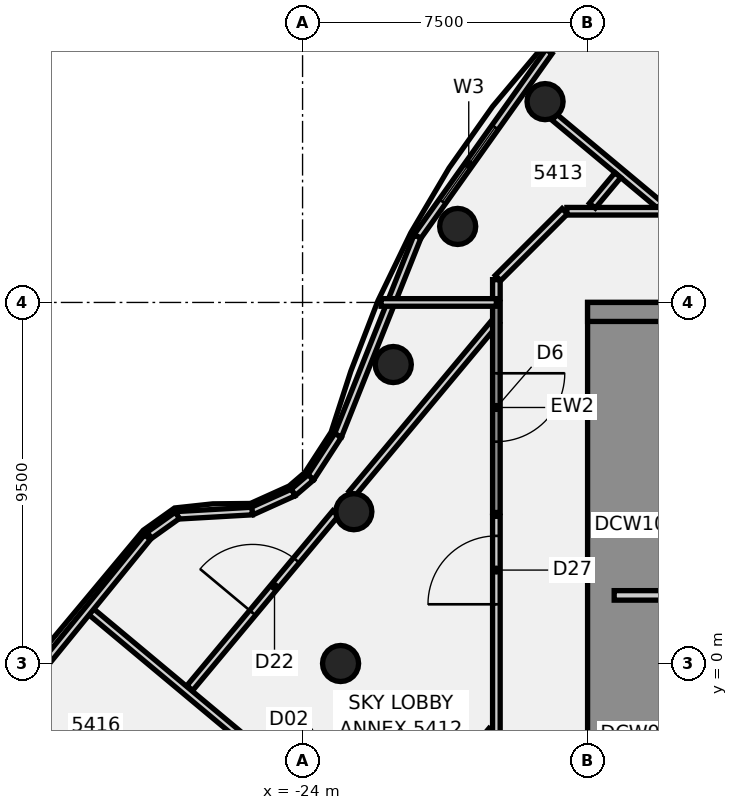
"""IFC4 building model, lengths in metres.
Left out: names, types, materials, properties, quantities, classifications, styles, units other than length and angle.
Written with IfcOpenShell. Run it as: python <this file> out.ifc"""

import sys

from ifc_helpers import new_model, si_unit, direction, frame, frame_2d, origin, origin_2d, place, context, subcontext, project, spatial, polyline, rectangle, circle, outline, extrude, element, fill, save


model = new_model("IFC4")
c1 = context("Model", 3, precision=1e-05, world=origin(), true_north=direction((0.0, 1.0)))
c2 = subcontext(c1, "Body", "Model", "MODEL_VIEW")
j1 = project(units=[si_unit("LENGTHUNIT", "METRE"), si_unit("PLANEANGLEUNIT", "RADIAN")], contexts=[c1])
p1 = place(None, origin())
s1 = spatial("IfcSite", under=j1, at=p1, CompositionType="ELEMENT")
p2 = place(p1, origin())
s2 = spatial("IfcBuilding", under=s1, at=p2, CompositionType="ELEMENT")
p3 = place(p2, frame((0.0, 0.0, 214.9)))
s3 = spatial("IfcBuildingStorey", under=s2, at=p3, CompositionType="ELEMENT", Elevation=214.9)
for number, where, z_axis, x_axis in (
    (1, (-17.619, 14.784, -0.18), (0.0, 0.0, 1.0), (1.0, 0.0, 0.0)),
    (2, (-19.919, 11.5, -0.18), (0.0, 0.0, 1.0), (1.0, 0.0, 0.0)),
    (3, (-21.613, 7.866, -0.18), (0.0, 0.0, 1.0), (1.0, 0.0, 0.0)),
    (4, (-22.651, 3.994, -0.18), (0.0, 0.0, 1.0), (1.0, 0.0, 0.0)),
    (5, (-23.0, 0.0, -0.18), (0.0, 0.0, 1.0), (1.0, 0.0, 0.0)),
):
    element("IfcColumn", number, at=place(p3, frame(where, z_axis=z_axis, x_axis=x_axis)), inside=s3, PredefinedType="COLUMN", context=c2, shape_type="SweptSolid", body=[
        extrude(circle(Radius=0.475, at=origin_2d()), origin(), (0.0, 0.0, 1.0), 5.04),
    ])
p4 = place(p3, frame((-29.578, 1.375, 0.0), z_axis=(0.0, 0.0, 1.0), x_axis=(0.767770502141, -0.6407249457, 0.0)))
e6 = element("IfcWall", 6, at=p4, inside=s3, PredefinedType="PARTITIONING", context=c2, shape_type="SweptSolid", body=[
    extrude(rectangle(XDim=8.394, YDim=0.2, at=frame_2d((4.197, 0.0))), origin(), (0.0, 0.0, 1.0), 4.16),
])
p5 = place(p4, frame((6.099, 0.0, 0.0)))
e7 = element("IfcOpeningElement", 7, at=p5, cuts=e6, PredefinedType="OPENING", context=c2, shape_type="SweptSolid", body=[
    extrude(rectangle(XDim=1.4, YDim=2.1, at=frame_2d((0.7, 1.05))), frame((0.0, 0.11, 0.0), z_axis=(0.0, -1.0, 0.0), x_axis=(1.0, 0.0, 0.0)), (0.0, 0.0, 1.0), 0.22),
])
p6 = place(p3, frame((-17.37, 14.371, 0.0), z_axis=(0.0, 0.0, 1.0), x_axis=(0.767916419385, -0.640550054905, 0.0)))
e8 = element("IfcWall", 8, at=p6, inside=s3, PredefinedType="PARTITIONING", context=c2, shape_type="SweptSolid", body=[
    extrude(rectangle(XDim=3.611, YDim=0.2, at=frame_2d((1.806, 0.0))), origin(), (0.0, 0.0, 1.0), 4.16),
])
p7 = place(p3, frame((-17.045, 11.9, 0.0), z_axis=(0.0, 0.0, 1.0), x_axis=(1.0, 0.0, 0.0)))
e9 = element("IfcWall", 9, at=p7, inside=s3, PredefinedType="PARTITIONING", context=c2, shape_type="SweptSolid", body=[
    extrude(rectangle(XDim=34.145, YDim=0.2, at=frame_2d((17.073, 0.0))), origin(), (0.0, 0.0, 1.0), 4.16),
])
p8 = place(p7, frame((24.44, 0.0, 0.0)))
e10 = element("IfcOpeningElement", 10, at=p8, cuts=e9, PredefinedType="OPENING", context=c2, shape_type="SweptSolid", body=[
    extrude(rectangle(XDim=1.8, YDim=2.1, at=frame_2d((0.9, 1.05))), frame((0.0, 0.11, 0.0), z_axis=(0.0, -1.0, 0.0), x_axis=(1.0, 0.0, 0.0)), (0.0, 0.0, 1.0), 0.22),
])
p9 = place(p7, frame((9.086, 0.0, 0.0)))
e11 = element("IfcOpeningElement", 11, at=p9, cuts=e9, PredefinedType="OPENING", context=c2, shape_type="SweptSolid", body=[
    extrude(rectangle(XDim=1.8, YDim=2.1, at=frame_2d((0.9, 1.05))), frame((0.0, 0.11, 0.0), z_axis=(0.0, -1.0, 0.0), x_axis=(1.0, 0.0, 0.0)), (0.0, 0.0, 1.0), 0.22),
])
p10 = place(p3, frame((-18.858, 10.142, 0.0), z_axis=(0.0, 0.0, 1.0), x_axis=(0.707106781187, 0.707106781187, 0.0)))
e12 = element("IfcWall", 12, at=p10, inside=s3, PredefinedType="PARTITIONING", context=c2, shape_type="SweptSolid", body=[
    extrude(rectangle(XDim=2.486, YDim=0.2, at=frame_2d((1.243, 0.0))), origin(), (0.0, 0.0, 1.0), 4.16),
])
p11 = place(p3, frame((-26.968, -0.647, 0.0), z_axis=(0.0, 0.0, 1.0), x_axis=(0.640736859204, 0.767760559847, 0.0)))
e13 = element("IfcWall", 13, at=p11, inside=s3, PredefinedType="PARTITIONING", context=c2, shape_type="SweptSolid", body=[
    extrude(rectangle(XDim=5.997, YDim=0.2, at=frame_2d((2.998, 0.0))), origin(), (0.0, 0.0, 1.0), 4.16),
])
p12 = place(p11, frame((2.58, 0.0, 0.0)))
e14 = element("IfcOpeningElement", 14, at=p12, cuts=e13, PredefinedType="OPENING", context=c2, shape_type="SweptSolid", body=[
    extrude(rectangle(XDim=1.8, YDim=2.1, at=frame_2d((0.9, 1.05))), frame((0.0, 0.11, 0.0), z_axis=(0.0, -1.0, 0.0), x_axis=(1.0, 0.0, 0.0)), (0.0, 0.0, 1.0), 0.22),
])
p13 = place(p3, frame((-22.701, 4.465, 0.0), z_axis=(0.0, 0.0, 1.0), x_axis=(0.640775177537, 0.767728579547, 0.0)))
e15 = element("IfcWall", 15, at=p13, inside=s3, PredefinedType="PARTITIONING", context=c2, shape_type="SweptSolid", body=[
    extrude(rectangle(XDim=5.933, YDim=0.2, at=frame_2d((2.966, 0.0))), origin(), (0.0, 0.0, 1.0), 4.16),
])
p14 = place(p3, frame((-16.375, 12.046, 0.0), z_axis=(0.0, 0.0, 1.0), x_axis=(0.640757178851, 0.767743601569, 0.0)))
e16 = element("IfcWall", 16, at=p14, inside=s3, PredefinedType="PARTITIONING", context=c2, shape_type="SweptSolid", body=[
    extrude(rectangle(XDim=1.048, YDim=0.2, at=frame_2d((0.524, 0.0))), origin(), (0.0, 0.0, 1.0), 4.16),
])
p15 = place(p3, frame((-21.748, -5.004, 0.0), z_axis=(0.0, 0.0, 1.0), x_axis=(0.640814436724, 0.767695810647, 0.0)))
e17 = element("IfcWall", 17, at=p15, inside=s3, PredefinedType="PARTITIONING", context=c2, shape_type="SweptSolid", body=[
    extrude(rectangle(XDim=4.229, YDim=0.15, at=frame_2d((2.115, 0.0))), origin(), (0.0, 0.0, 1.0), 4.16),
])
p16 = place(p3, frame((-18.9, -10.1, 0.0), z_axis=(0.0, 0.0, 1.0), x_axis=(0.0, 1.0, 0.0)))
e18 = element("IfcWall", 18, at=p16, inside=s3, PredefinedType="PARTITIONING", context=c2, shape_type="SweptSolid", body=[
    extrude(rectangle(XDim=13.973, YDim=0.2, at=frame_2d((6.986, 0.0))), origin(), (0.0, 0.0, 1.0), 4.16),
])
p17 = place(p16, frame((11.658, 0.0, 0.0)))
e19 = element("IfcOpeningElement", 19, at=p17, cuts=e18, PredefinedType="OPENING", context=c2, shape_type="SweptSolid", body=[
    extrude(rectangle(XDim=1.8, YDim=2.1, at=frame_2d((0.9, 1.05))), frame((0.0, 0.11, 0.0), z_axis=(0.0, -1.0, 0.0), x_axis=(1.0, 0.0, 0.0)), (0.0, 0.0, 1.0), 0.22),
])
p18 = place(p3, frame((-18.9, 9.6, 0.0), z_axis=(0.0, 0.0, 1.0), x_axis=(0.0, 1.0, 0.0)))
e20 = element("IfcWall", 20, at=p18, inside=s3, PredefinedType="PARTITIONING", context=c2, shape_type="SweptSolid", body=[
    extrude(rectangle(XDim=0.5, YDim=0.2, at=frame_2d((0.25, 0.0))), origin(), (0.0, 0.0, 1.0), 4.16),
])
p19 = place(p3, frame((-17.515, 16.103, 0.0), z_axis=(0.0, 0.0, 1.0), x_axis=(-0.57952016676, -0.814957898495, 0.0)))
e21 = element("IfcWall", 21, at=p19, inside=s3, PredefinedType="SOLIDWALL", context=c2, shape_type="SweptSolid", body=[
    extrude(rectangle(XDim=5.973, YDim=0.2, at=frame_2d((2.986, 0.0))), origin(), (0.0, 0.0, 1.0), 4.86),
])
p20 = place(p19, frame((2.445, 0.0, 1.4)))
e22 = element("IfcOpeningElement", 22, at=p20, cuts=e21, PredefinedType="OPENING", context=c2, shape_type="SweptSolid", body=[
    extrude(rectangle(XDim=2.4, YDim=2.1, at=frame_2d((1.2, 1.05))), frame((0.0, 0.11, 0.0), z_axis=(0.0, -1.0, 0.0), x_axis=(1.0, 0.0, 0.0)), (0.0, 0.0, 1.0), 0.22),
])
p21 = place(p3, frame((-20.976, 11.235, 0.0), z_axis=(0.0, 0.0, 1.0), x_axis=(-0.370957476811, -0.928649853496, 0.0)))
e23 = element("IfcWall", 23, at=p21, inside=s3, PredefinedType="SOLIDWALL", context=c2, shape_type="SweptSolid", body=[
    extrude(rectangle(XDim=5.636, YDim=0.2, at=frame_2d((2.818, 0.0))), origin(), (0.0, 0.0, 1.0), 4.86),
])
p22 = place(p3, frame((-23.067, 6.001, 0.0), z_axis=(0.0, 0.0, 1.0), x_axis=(-0.543951096274, -0.839116919662, 0.0)))
e24 = element("IfcWall", 24, at=p22, inside=s3, PredefinedType="SOLIDWALL", context=c2, shape_type="SweptSolid", body=[
    extrude(rectangle(XDim=1.316, YDim=0.2, at=frame_2d((0.658, 0.0))), origin(), (0.0, 0.0, 1.0), 4.86),
])
p23 = place(p3, frame((-23.783, 4.897, 0.0), z_axis=(0.0, 0.0, 1.0), x_axis=(-0.758719364192, -0.651417628254, 0.0)))
e25 = element("IfcWall", 25, at=p23, inside=s3, PredefinedType="SOLIDWALL", context=c2, shape_type="SweptSolid", body=[
    extrude(rectangle(XDim=0.61, YDim=0.2, at=frame_2d((0.305, 0.0))), origin(), (0.0, 0.0, 1.0), 4.86),
])
p24 = place(p3, frame((-24.246, 4.5, 0.0), z_axis=(0.0, 0.0, 1.0), x_axis=(-0.911490011806, -0.411322207494, 0.0)))
e26 = element("IfcWall", 26, at=p24, inside=s3, PredefinedType="SOLIDWALL", context=c2, shape_type="SweptSolid", body=[
    extrude(rectangle(XDim=1.187, YDim=0.2, at=frame_2d((0.594, 0.0))), origin(), (0.0, 0.0, 1.0), 4.86),
])
p25 = place(p3, frame((-25.328, 4.011, 0.0), z_axis=(0.0, 0.0, 1.0), x_axis=(-0.998367905446, -0.057109766027, 0.0)))
e27 = element("IfcWall", 27, at=p25, inside=s3, PredefinedType="SOLIDWALL", context=c2, shape_type="SweptSolid", body=[
    extrude(rectangle(XDim=1.971, YDim=0.2, at=frame_2d((0.985, 0.0))), origin(), (0.0, 0.0, 1.0), 4.86),
])
p26 = place(p3, frame((-27.295, 3.899, 0.0), z_axis=(0.0, 0.0, 1.0), x_axis=(-0.814189379779, -0.580599391883, 0.0)))
e28 = element("IfcWall", 28, at=p26, inside=s3, PredefinedType="SOLIDWALL", context=c2, shape_type="SweptSolid", body=[
    extrude(rectangle(XDim=0.904, YDim=0.2, at=frame_2d((0.452, 0.0))), origin(), (0.0, 0.0, 1.0), 4.86),
])
p27 = place(p3, frame((-28.081, 3.326, 0.0), z_axis=(0.0, 0.0, 1.0), x_axis=(-0.631092649572, -0.775707462679, 0.0)))
e29 = element("IfcWall", 29, at=p27, inside=s3, PredefinedType="SOLIDWALL", context=c2, shape_type="SweptSolid", body=[
    extrude(rectangle(XDim=19.7, YDim=0.2, at=frame_2d((9.85, 0.0))), origin(), (0.0, 0.0, 1.0), 4.86),
])
p28 = place(p3, frame((-18.9, 9.5, 0.0), z_axis=(0.0, 0.0, 1.0), x_axis=(0.0, -1.0, 0.0)))
e30 = element("IfcWall", 30, at=p28, inside=s3, PredefinedType="SOLIDWALL", context=c2, shape_type="SweptSolid", body=[
    extrude(rectangle(XDim=5.527, YDim=0.2, at=frame_2d((2.764, 0.0))), origin(), (0.0, 0.0, 1.0), 4.364),
])
p29 = place(p28, frame((1.864, 0.0, 0.0)))
e31 = element("IfcOpeningElement", 31, at=p29, cuts=e30, PredefinedType="OPENING", context=c2, shape_type="SweptSolid", body=[
    extrude(rectangle(XDim=1.8, YDim=2.4, at=frame_2d((0.9, 1.2))), frame((0.0, 0.11, 0.0), z_axis=(0.0, -1.0, 0.0), x_axis=(1.0, 0.0, 0.0)), (0.0, 0.0, 1.0), 0.22),
])
p30 = place(p3, frame((-18.9, 9.5, 0.0), z_axis=(0.0, 0.0, 1.0), x_axis=(-1.0, 0.0, 0.0)))
e32 = element("IfcWall", 32, at=p30, inside=s3, PredefinedType="SOLIDWALL", context=c2, shape_type="SweptSolid", body=[
    extrude(rectangle(XDim=3.033, YDim=0.2, at=frame_2d((1.517, 0.0))), origin(), (0.0, 0.0, 1.0), 4.86),
])
p31 = place(p3, origin())
e33 = element("IfcWall", 33, at=p31, inside=s3, PredefinedType="SHEAR", context=c2, shape_type="SweptSolid", body=[
    extrude(outline(polyline([(-13.5, -8.125), (-16.0, -8.125), (-16.0, -5.625), (-13.5, -5.625), (-13.5, -5.375), (-16.0, -5.375), (-16.0, 5.375), (-13.5, 5.375), (-13.5, 5.625), (-16.0, 5.625), (-16.0, 8.125), (-13.5, 8.125), (-13.5, 9.0), (-16.0, 9.0), (-16.5, 9.0), (-16.5, -9.0), (-16.0, -9.0), (-13.5, -9.0), (-13.5, -8.125)])), origin(), (0.0, 0.0, 1.0), 4.86),
])
p32 = place(p3, frame((-16.5, 9.25, 0.0), z_axis=(0.0, 0.0, 1.0), x_axis=(1.0, 0.0, 0.0)))
e34 = element("IfcWall", 34, at=p32, inside=s3, PredefinedType="SHEAR", context=c2, shape_type="SweptSolid", body=[
    extrude(rectangle(XDim=13.0, YDim=0.5, at=frame_2d((6.5, 0.0))), origin(), (0.0, 0.0, 1.0), 4.86),
])
p33 = place(p32, frame((4.15, 0.0, 0.0)))
e35 = element("IfcOpeningElement", 35, at=p33, cuts=e34, PredefinedType="OPENING", context=c2, shape_type="SweptSolid", body=[
    extrude(rectangle(XDim=1.4, YDim=2.1, at=frame_2d((0.7, 1.05))), frame((0.0, 0.26, 0.0), z_axis=(0.0, -1.0, 0.0), x_axis=(1.0, 0.0, 0.0)), (0.0, 0.0, 1.0), 0.52),
])
p34 = place(p3, frame((-15.8, 1.792, 0.0), z_axis=(0.0, 0.0, 1.0), x_axis=(1.0, 0.0, 0.0)))
e36 = element("IfcWall", 36, at=p34, inside=s3, PredefinedType="PARTITIONING", context=c2, shape_type="SweptSolid", body=[
    extrude(rectangle(XDim=2.3, YDim=0.25, at=frame_2d((1.15, 0.0))), origin(), (0.0, 0.0, 1.0), 4.86),
])
p35 = place(p12, origin())
e37 = element("IfcDoor", 37, at=p35, inside=s3, OperationType="DOUBLE_DOOR_SINGLE_SWING", PredefinedType="DOOR", context=c2, shape_type="SweptSolid", body=[
    extrude(rectangle(XDim=1.8, YDim=2.1, at=frame_2d((0.9, 1.05))), frame((0.0, 0.025, 0.0), z_axis=(0.0, -1.0, 0.0), x_axis=(1.0, 0.0, 0.0)), (0.0, 0.0, 1.0), 0.05),
])
fill(e14, e37)
p36 = place(p17, frame((1.8, 0.0, 0.0), z_axis=(0.0, 0.0, 1.0), x_axis=(-1.0, 0.0, 0.0)))
e38 = element("IfcDoor", 38, at=p36, inside=s3, OperationType="DOUBLE_DOOR_SINGLE_SWING", PredefinedType="DOOR", context=c2, shape_type="SweptSolid", body=[
    extrude(rectangle(XDim=1.8, YDim=2.1, at=frame_2d((0.9, 1.05))), frame((0.0, 0.025, 0.0), z_axis=(0.0, -1.0, 0.0), x_axis=(1.0, 0.0, 0.0)), (0.0, 0.0, 1.0), 0.05),
])
fill(e19, e38)
p37 = place(p20, origin())
e39 = element("IfcWindow", 39, at=p37, inside=s3, PartitioningType="SINGLE_PANEL", PredefinedType="WINDOW", context=c2, shape_type="SweptSolid", body=[
    extrude(rectangle(XDim=2.4, YDim=2.1, at=frame_2d((1.2, 1.05))), frame((0.0, 0.03, 0.0), z_axis=(0.0, -1.0, 0.0), x_axis=(1.0, 0.0, 0.0)), (0.0, 0.0, 1.0), 0.06),
])
fill(e22, e39)
p38 = place(p29, origin())
e40 = element("IfcDoor", 40, at=p38, inside=s3, OperationType="SINGLE_SWING_LEFT", PredefinedType="DOOR", context=c2, shape_type="SweptSolid", body=[
    extrude(rectangle(XDim=1.8, YDim=2.4, at=frame_2d((0.9, 1.2))), frame((0.0, 0.025, 0.0), z_axis=(0.0, -1.0, 0.0), x_axis=(1.0, 0.0, 0.0)), (0.0, 0.0, 1.0), 0.05),
])
fill(e31, e40)
save(model, sys.argv[1])
